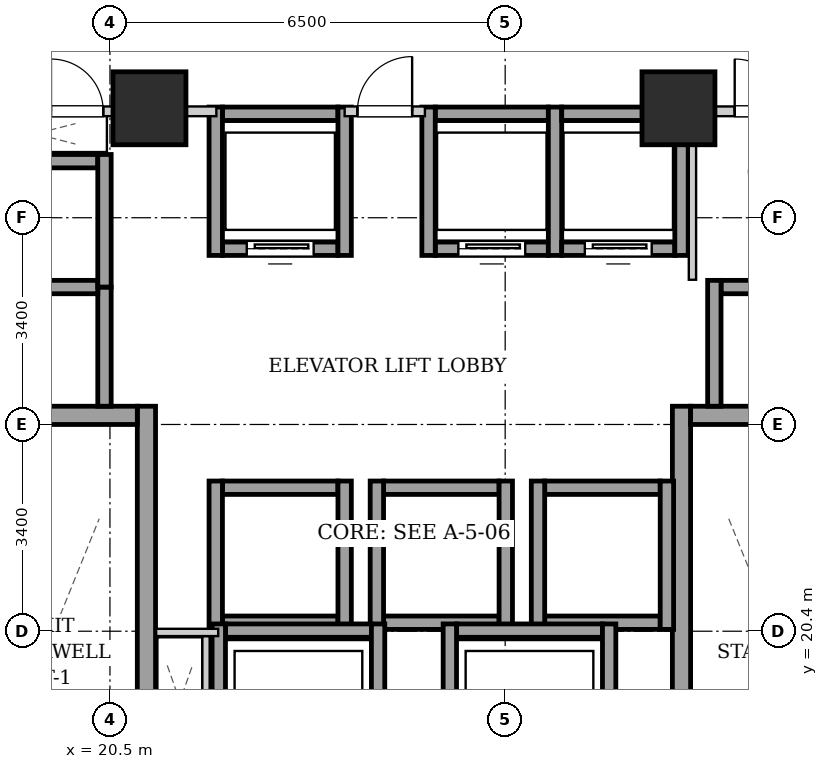
"""IFC4 building model, lengths in metres.
Left out: names, types, materials, properties, quantities, classifications, styles, units other than length and angle.
Written with IfcOpenShell. Run it as: python <this file> out.ifc"""

import sys

from ifc_helpers import new_model, si_unit, direction, frame, frame_2d, origin, origin_2d, place, context, subcontext, project, spatial, rectangle, extrude, element, fill, save


model = new_model("IFC4")
c1 = context("Model", 3, precision=1e-05, world=origin(), true_north=direction((0.0, 1.0)))
c2 = subcontext(c1, "Body", "Model", "MODEL_VIEW")
j1 = project(units=[si_unit("LENGTHUNIT", "METRE"), si_unit("PLANEANGLEUNIT", "RADIAN")], contexts=[c1])
p1 = place(None, origin())
s1 = spatial("IfcSite", under=j1, at=p1, CompositionType="ELEMENT")
p2 = place(p1, origin())
s2 = spatial("IfcBuilding", under=s1, at=p2, CompositionType="ELEMENT")
p3 = place(p2, frame((0.0, 0.0, 32.2)))
s3 = spatial("IfcBuildingStorey", under=s2, at=p3, CompositionType="ELEMENT", Elevation=32.2)
for number, where, z_axis, x_axis in (
    (1, (21.15, 29.0, 0.0), (0.0, 0.0, 1.0), (1.0, 0.0, 0.0)),
    (2, (29.85, 29.0, 0.0), (0.0, 0.0, 1.0), (1.0, 0.0, 0.0)),
):
    element("IfcColumn", number, at=place(p3, frame(where, z_axis=z_axis, x_axis=x_axis)), inside=s3, PredefinedType="COLUMN", context=c2, shape_type="SweptSolid", body=[
        extrude(rectangle(XDim=1.2, YDim=1.2, at=origin_2d()), origin(), (0.0, 0.0, 1.0), 3.2),
    ])
p4 = place(p3, frame((21.1, 15.1, 0.0), z_axis=(0.0, 0.0, 1.0), x_axis=(0.0, 1.0, 0.0)))
e3 = element("IfcWall", 3, at=p4, inside=s3, PredefinedType="SHEAR", context=c2, shape_type="SweptSolid", body=[
    extrude(rectangle(XDim=9.0, YDim=0.3, at=frame_2d((4.5, 0.0))), origin(), (0.0, 0.0, 1.0), 2.94),
])
p5 = place(p3, frame((18.1, 23.95, 0.0), z_axis=(0.0, 0.0, 1.0), x_axis=(1.0, 0.0, 0.0)))
e4 = element("IfcWall", 4, at=p5, inside=s3, PredefinedType="SHEAR", context=c2, shape_type="SweptSolid", body=[
    extrude(rectangle(XDim=2.85, YDim=0.3, at=frame_2d((1.425, 0.0))), origin(), (0.0, 0.0, 1.0), 2.94),
])
p6 = place(p3, frame((29.9, 15.1, 0.0), z_axis=(0.0, 0.0, 1.0), x_axis=(0.0, 1.0, 0.0)))
e5 = element("IfcWall", 5, at=p6, inside=s3, PredefinedType="SHEAR", context=c2, shape_type="SweptSolid", body=[
    extrude(rectangle(XDim=9.0, YDim=0.3, at=frame_2d((4.5, 0.0))), origin(), (0.0, 0.0, 1.0), 2.94),
])
p7 = place(p3, frame((30.05, 23.95, 0.0), z_axis=(0.0, 0.0, 1.0), x_axis=(1.0, 0.0, 0.0)))
e6 = element("IfcWall", 6, at=p7, inside=s3, PredefinedType="SHEAR", context=c2, shape_type="SweptSolid", body=[
    extrude(rectangle(XDim=2.85, YDim=0.3, at=frame_2d((1.425, 0.0))), origin(), (0.0, 0.0, 1.0), 2.94),
])
p8 = place(p3, frame((22.35, 26.69, 0.0), z_axis=(0.0, 0.0, 1.0), x_axis=(1.0, 0.0, 0.0)))
e7 = element("IfcWall", 7, at=p8, inside=s3, PredefinedType="SHEAR", context=c2, shape_type="SweptSolid", body=[
    extrude(rectangle(XDim=1.9, YDim=0.22, at=frame_2d((0.95, 0.0))), origin(), (0.0, 0.0, 1.0), 2.94),
])
p9 = place(p8, frame((0.4, 0.0, 0.0)))
e8 = element("IfcOpeningElement", 8, at=p9, cuts=e7, PredefinedType="OPENING", context=c2, shape_type="SweptSolid", body=[
    extrude(rectangle(XDim=1.1, YDim=2.15, at=frame_2d((0.55, 1.075))), frame((0.0, 0.12, 0.0), z_axis=(0.0, -1.0, 0.0), x_axis=(1.0, 0.0, 0.0)), (0.0, 0.0, 1.0), 0.24),
])
p10 = place(p3, frame((22.35, 28.91, 0.0), z_axis=(0.0, 0.0, 1.0), x_axis=(1.0, 0.0, 0.0)))
e9 = element("IfcWall", 9, at=p10, inside=s3, PredefinedType="SHEAR", context=c2, shape_type="SweptSolid", body=[
    extrude(rectangle(XDim=1.9, YDim=0.22, at=frame_2d((0.95, 0.0))), origin(), (0.0, 0.0, 1.0), 2.94),
])
for number, where, z_axis, x_axis in (
    (10, (22.24, 26.58, 0.0), (0.0, 0.0, 1.0), (0.0, 1.0, 0.0)),
    (11, (24.36, 26.58, 0.0), (0.0, 0.0, 1.0), (0.0, 1.0, 0.0)),
):
    element("IfcWall", number, at=place(p3, frame(where, z_axis=z_axis, x_axis=x_axis)), inside=s3, PredefinedType="SHEAR", context=c2, shape_type="SweptSolid", body=[
        extrude(rectangle(XDim=2.44, YDim=0.22, at=frame_2d((1.22, 0.0))), origin(), (0.0, 0.0, 1.0), 2.94),
    ])
p11 = place(p3, frame((25.85, 26.69, 0.0), z_axis=(0.0, 0.0, 1.0), x_axis=(1.0, 0.0, 0.0)))
e12 = element("IfcWall", 12, at=p11, inside=s3, PredefinedType="SHEAR", context=c2, shape_type="SweptSolid", body=[
    extrude(rectangle(XDim=1.86, YDim=0.22, at=frame_2d((0.93, 0.0))), origin(), (0.0, 0.0, 1.0), 2.94),
])
p12 = place(p11, frame((0.38, 0.0, 0.0)))
e13 = element("IfcOpeningElement", 13, at=p12, cuts=e12, PredefinedType="OPENING", context=c2, shape_type="SweptSolid", body=[
    extrude(rectangle(XDim=1.1, YDim=2.15, at=frame_2d((0.55, 1.075))), frame((0.0, 0.12, 0.0), z_axis=(0.0, -1.0, 0.0), x_axis=(1.0, 0.0, 0.0)), (0.0, 0.0, 1.0), 0.24),
])
p13 = place(p3, frame((25.85, 28.91, 0.0), z_axis=(0.0, 0.0, 1.0), x_axis=(1.0, 0.0, 0.0)))
e14 = element("IfcWall", 14, at=p13, inside=s3, PredefinedType="SHEAR", context=c2, shape_type="SweptSolid", body=[
    extrude(rectangle(XDim=1.86, YDim=0.22, at=frame_2d((0.93, 0.0))), origin(), (0.0, 0.0, 1.0), 2.94),
])
for number, where, z_axis, x_axis in (
    (15, (25.74, 26.58, 0.0), (0.0, 0.0, 1.0), (0.0, 1.0, 0.0)),
    (16, (27.82, 26.58, 0.0), (0.0, 0.0, 1.0), (0.0, 1.0, 0.0)),
):
    element("IfcWall", number, at=place(p3, frame(where, z_axis=z_axis, x_axis=x_axis)), inside=s3, PredefinedType="SHEAR", context=c2, shape_type="SweptSolid", body=[
        extrude(rectangle(XDim=2.44, YDim=0.22, at=frame_2d((1.22, 0.0))), origin(), (0.0, 0.0, 1.0), 2.94),
    ])
p14 = place(p3, frame((27.93, 26.69, 0.0), z_axis=(0.0, 0.0, 1.0), x_axis=(1.0, 0.0, 0.0)))
e17 = element("IfcWall", 17, at=p14, inside=s3, PredefinedType="SHEAR", context=c2, shape_type="SweptSolid", body=[
    extrude(rectangle(XDim=1.86, YDim=0.22, at=frame_2d((0.93, 0.0))), origin(), (0.0, 0.0, 1.0), 2.94),
])
p15 = place(p14, frame((0.38, 0.0, 0.0)))
e18 = element("IfcOpeningElement", 18, at=p15, cuts=e17, PredefinedType="OPENING", context=c2, shape_type="SweptSolid", body=[
    extrude(rectangle(XDim=1.1, YDim=2.15, at=frame_2d((0.55, 1.075))), frame((0.0, 0.12, 0.0), z_axis=(0.0, -1.0, 0.0), x_axis=(1.0, 0.0, 0.0)), (0.0, 0.0, 1.0), 0.24),
])
p16 = place(p3, frame((27.93, 28.91, 0.0), z_axis=(0.0, 0.0, 1.0), x_axis=(1.0, 0.0, 0.0)))
e19 = element("IfcWall", 19, at=p16, inside=s3, PredefinedType="SHEAR", context=c2, shape_type="SweptSolid", body=[
    extrude(rectangle(XDim=1.86, YDim=0.22, at=frame_2d((0.93, 0.0))), origin(), (0.0, 0.0, 1.0), 2.94),
])
p17 = place(p3, frame((29.9, 26.58, 0.0), z_axis=(0.0, 0.0, 1.0), x_axis=(0.0, 1.0, 0.0)))
e20 = element("IfcWall", 20, at=p17, inside=s3, PredefinedType="SHEAR", context=c2, shape_type="SweptSolid", body=[
    extrude(rectangle(XDim=2.44, YDim=0.22, at=frame_2d((1.22, 0.0))), origin(), (0.0, 0.0, 1.0), 2.94),
])
for number, where, z_axis, x_axis in (
    (21, (22.35, 20.54, 0.0), (0.0, 0.0, 1.0), (1.0, 0.0, 0.0)),
    (22, (22.35, 22.76, 0.0), (0.0, 0.0, 1.0), (1.0, 0.0, 0.0)),
):
    element("IfcWall", number, at=place(p3, frame(where, z_axis=z_axis, x_axis=x_axis)), inside=s3, PredefinedType="SHEAR", context=c2, shape_type="SweptSolid", body=[
        extrude(rectangle(XDim=1.9, YDim=0.22, at=frame_2d((0.95, 0.0))), origin(), (0.0, 0.0, 1.0), 2.94),
    ])
for number, where, z_axis, x_axis in (
    (23, (22.24, 20.43, 0.0), (0.0, 0.0, 1.0), (0.0, 1.0, 0.0)),
    (24, (24.36, 20.43, 0.0), (0.0, 0.0, 1.0), (0.0, 1.0, 0.0)),
):
    element("IfcWall", number, at=place(p3, frame(where, z_axis=z_axis, x_axis=x_axis)), inside=s3, PredefinedType="SHEAR", context=c2, shape_type="SweptSolid", body=[
        extrude(rectangle(XDim=2.44, YDim=0.22, at=frame_2d((1.22, 0.0))), origin(), (0.0, 0.0, 1.0), 2.94),
    ])
for number, where, z_axis, x_axis in (
    (25, (25.0, 20.54, 0.0), (0.0, 0.0, 1.0), (1.0, 0.0, 0.0)),
    (26, (25.0, 22.76, 0.0), (0.0, 0.0, 1.0), (1.0, 0.0, 0.0)),
):
    element("IfcWall", number, at=place(p3, frame(where, z_axis=z_axis, x_axis=x_axis)), inside=s3, PredefinedType="SHEAR", context=c2, shape_type="SweptSolid", body=[
        extrude(rectangle(XDim=1.9, YDim=0.22, at=frame_2d((0.95, 0.0))), origin(), (0.0, 0.0, 1.0), 2.94),
    ])
for number, where, z_axis, x_axis in (
    (27, (24.89, 20.43, 0.0), (0.0, 0.0, 1.0), (0.0, 1.0, 0.0)),
    (28, (27.01, 20.43, 0.0), (0.0, 0.0, 1.0), (0.0, 1.0, 0.0)),
):
    element("IfcWall", number, at=place(p3, frame(where, z_axis=z_axis, x_axis=x_axis)), inside=s3, PredefinedType="SHEAR", context=c2, shape_type="SweptSolid", body=[
        extrude(rectangle(XDim=2.44, YDim=0.22, at=frame_2d((1.22, 0.0))), origin(), (0.0, 0.0, 1.0), 2.94),
    ])
for number, where, z_axis, x_axis in (
    (29, (27.65, 20.54, 0.0), (0.0, 0.0, 1.0), (1.0, 0.0, 0.0)),
    (30, (27.65, 22.76, 0.0), (0.0, 0.0, 1.0), (1.0, 0.0, 0.0)),
):
    element("IfcWall", number, at=place(p3, frame(where, z_axis=z_axis, x_axis=x_axis)), inside=s3, PredefinedType="SHEAR", context=c2, shape_type="SweptSolid", body=[
        extrude(rectangle(XDim=1.9, YDim=0.22, at=frame_2d((0.95, 0.0))), origin(), (0.0, 0.0, 1.0), 2.94),
    ])
for number, where, z_axis, x_axis in (
    (31, (27.54, 20.43, 0.0), (0.0, 0.0, 1.0), (0.0, 1.0, 0.0)),
    (32, (29.66, 20.43, 0.0), (0.0, 0.0, 1.0), (0.0, 1.0, 0.0)),
):
    element("IfcWall", number, at=place(p3, frame(where, z_axis=z_axis, x_axis=x_axis)), inside=s3, PredefinedType="SHEAR", context=c2, shape_type="SweptSolid", body=[
        extrude(rectangle(XDim=2.44, YDim=0.22, at=frame_2d((1.22, 0.0))), origin(), (0.0, 0.0, 1.0), 2.94),
    ])
p18 = place(p3, frame((20.41, 24.1, 0.0), z_axis=(0.0, 0.0, 1.0), x_axis=(0.0, 1.0, 0.0)))
e33 = element("IfcWall", 33, at=p18, inside=s3, PredefinedType="SHEAR", context=c2, shape_type="SweptSolid", body=[
    extrude(rectangle(XDim=1.96, YDim=0.22, at=frame_2d((0.98, 0.0))), origin(), (0.0, 0.0, 1.0), 2.94),
])
for number, where, z_axis, x_axis in (
    (34, (18.4, 26.06, 0.0), (0.0, 0.0, 1.0), (1.0, 0.0, 0.0)),
    (35, (18.4, 28.13, 0.0), (0.0, 0.0, 1.0), (1.0, 0.0, 0.0)),
):
    element("IfcWall", number, at=place(p3, frame(where, z_axis=z_axis, x_axis=x_axis)), inside=s3, PredefinedType="SHEAR", context=c2, shape_type="SweptSolid", body=[
        extrude(rectangle(XDim=1.9, YDim=0.22, at=frame_2d((0.95, 0.0))), origin(), (0.0, 0.0, 1.0), 2.94),
    ])
p19 = place(p3, frame((20.41, 26.06, 0.0), z_axis=(0.0, 0.0, 1.0), x_axis=(0.0, 1.0, 0.0)))
e36 = element("IfcWall", 36, at=p19, inside=s3, PredefinedType="SHEAR", context=c2, shape_type="SweptSolid", body=[
    extrude(rectangle(XDim=2.18, YDim=0.22, at=frame_2d((1.09, 0.0))), origin(), (0.0, 0.0, 1.0), 2.94),
])
p20 = place(p3, frame((30.55, 26.06, 0.0), z_axis=(0.0, 0.0, 1.0), x_axis=(1.0, 0.0, 0.0)))
e37 = element("IfcWall", 37, at=p20, inside=s3, PredefinedType="SHEAR", context=c2, shape_type="SweptSolid", body=[
    extrude(rectangle(XDim=1.9, YDim=0.22, at=frame_2d((0.95, 0.0))), origin(), (0.0, 0.0, 1.0), 2.94),
])
p21 = place(p3, frame((30.44, 24.1, 0.0), z_axis=(0.0, 0.0, 1.0), x_axis=(0.0, 1.0, 0.0)))
e38 = element("IfcWall", 38, at=p21, inside=s3, PredefinedType="SHEAR", context=c2, shape_type="SweptSolid", body=[
    extrude(rectangle(XDim=2.07, YDim=0.22, at=frame_2d((1.035, 0.0))), origin(), (0.0, 0.0, 1.0), 2.94),
])
p22 = place(p3, frame((22.4, 20.41, 0.0), z_axis=(0.0, 0.0, 1.0), x_axis=(1.0, 0.0, 0.0)))
e39 = element("IfcWall", 39, at=p22, inside=s3, PredefinedType="SHEAR", context=c2, shape_type="SweptSolid", body=[
    extrude(rectangle(XDim=2.4, YDim=0.22, at=frame_2d((1.2, 0.0))), origin(), (0.0, 0.0, 1.0), 2.94),
])
for number, where, z_axis, x_axis in (
    (40, (22.29, 17.98, 0.0), (0.0, 0.0, 1.0), (0.0, 1.0, 0.0)),
    (41, (24.91, 17.98, 0.0), (0.0, 0.0, 1.0), (0.0, 1.0, 0.0)),
):
    element("IfcWall", number, at=place(p3, frame(where, z_axis=z_axis, x_axis=x_axis)), inside=s3, PredefinedType="SHEAR", context=c2, shape_type="SweptSolid", body=[
        extrude(rectangle(XDim=2.54, YDim=0.22, at=frame_2d((1.27, 0.0))), origin(), (0.0, 0.0, 1.0), 2.94),
    ])
p23 = place(p3, frame((26.2, 20.41, 0.0), z_axis=(0.0, 0.0, 1.0), x_axis=(1.0, 0.0, 0.0)))
e42 = element("IfcWall", 42, at=p23, inside=s3, PredefinedType="SHEAR", context=c2, shape_type="SweptSolid", body=[
    extrude(rectangle(XDim=2.4, YDim=0.22, at=frame_2d((1.2, 0.0))), origin(), (0.0, 0.0, 1.0), 2.94),
])
for number, where, z_axis, x_axis in (
    (43, (26.09, 17.98, 0.0), (0.0, 0.0, 1.0), (0.0, 1.0, 0.0)),
    (44, (28.71, 17.98, 0.0), (0.0, 0.0, 1.0), (0.0, 1.0, 0.0)),
):
    element("IfcWall", number, at=place(p3, frame(where, z_axis=z_axis, x_axis=x_axis)), inside=s3, PredefinedType="SHEAR", context=c2, shape_type="SweptSolid", body=[
        extrude(rectangle(XDim=2.54, YDim=0.22, at=frame_2d((1.27, 0.0))), origin(), (0.0, 0.0, 1.0), 2.94),
    ])
p24 = place(p3, frame((24.36, 28.95, 0.0), z_axis=(0.0, 0.0, 1.0), x_axis=(1.0, 0.0, 0.0)))
e45 = element("IfcWall", 45, at=p24, inside=s3, PredefinedType="PARTITIONING", context=c2, shape_type="SweptSolid", body=[
    extrude(rectangle(XDim=1.32, YDim=0.16, at=frame_2d((0.66, 0.0))), origin(), (0.0, 0.0, 1.0), 2.155),
])
p25 = place(p24, frame((0.21, 0.0, 0.0)))
e46 = element("IfcOpeningElement", 46, at=p25, cuts=e45, PredefinedType="OPENING", context=c2, shape_type="SweptSolid", body=[
    extrude(rectangle(XDim=0.9, YDim=2.05, at=frame_2d((0.45, 1.025))), frame((0.0, 0.09, 0.0), z_axis=(0.0, -1.0, 0.0), x_axis=(1.0, 0.0, 0.0)), (0.0, 0.0, 1.0), 0.18),
])
p26 = place(p3, frame((17.96, 28.95, 0.0), z_axis=(0.0, 0.0, 1.0), x_axis=(1.0, 0.0, 0.0)))
e47 = element("IfcWall", 47, at=p26, inside=s3, PredefinedType="PARTITIONING", context=c2, shape_type="SweptSolid", body=[
    extrude(rectangle(XDim=4.29, YDim=0.16, at=frame_2d((2.145, 0.0))), origin(), (0.0, 0.0, 1.0), 2.155),
])
p27 = place(p26, frame((1.57, 0.0, 0.0)))
e48 = element("IfcOpeningElement", 48, at=p27, cuts=e47, PredefinedType="OPENING", context=c2, shape_type="SweptSolid", body=[
    extrude(rectangle(XDim=0.86, YDim=2.05, at=frame_2d((0.43, 1.025))), frame((0.0, 0.09, 0.0), z_axis=(0.0, -1.0, 0.0), x_axis=(1.0, 0.0, 0.0)), (0.0, 0.0, 1.0), 0.18),
])
p28 = place(p3, frame((22.08, 18.2, 0.0), z_axis=(0.0, 0.0, 1.0), x_axis=(0.0, 1.0, 0.0)))
e49 = element("IfcWall", 49, at=p28, inside=s3, PredefinedType="PARTITIONING", context=c2, shape_type="SweptSolid", body=[
    extrude(rectangle(XDim=2.12, YDim=0.12, at=frame_2d((1.06, 0.0))), origin(), (0.0, 0.0, 1.0), 2.94),
])
p29 = place(p3, frame((22.28, 20.38, 0.0), z_axis=(0.0, 0.0, 1.0), x_axis=(-1.0, 0.0, 0.0)))
e50 = element("IfcWall", 50, at=p29, inside=s3, PredefinedType="PARTITIONING", context=c2, shape_type="SweptSolid", body=[
    extrude(rectangle(XDim=1.02, YDim=0.12, at=frame_2d((0.51, 0.0))), origin(), (0.0, 0.0, 1.0), 2.94),
])
p30 = place(p3, frame((30.08, 26.18, 0.0), z_axis=(0.0, 0.0, 1.0), x_axis=(0.0, 1.0, 0.0)))
e51 = element("IfcWall", 51, at=p30, inside=s3, PredefinedType="PARTITIONING", context=c2, shape_type="SweptSolid", body=[
    extrude(rectangle(XDim=2.68, YDim=0.12, at=frame_2d((1.34, 0.0))), origin(), (0.0, 0.0, 1.0), 2.94),
])
p31 = place(p3, frame((30.08, 28.95, 0.0), z_axis=(0.0, 0.0, 1.0), x_axis=(1.0, 0.0, 0.0)))
e52 = element("IfcWall", 52, at=p31, inside=s3, PredefinedType="PARTITIONING", context=c2, shape_type="SweptSolid", body=[
    extrude(rectangle(XDim=2.96, YDim=0.16, at=frame_2d((1.48, 0.0))), origin(), (0.0, 0.0, 1.0), 2.94),
])
p32 = place(p31, frame((0.695, 0.0, 0.0)))
e53 = element("IfcOpeningElement", 53, at=p32, cuts=e52, PredefinedType="OPENING", context=c2, shape_type="SweptSolid", body=[
    extrude(rectangle(XDim=0.86, YDim=2.05, at=frame_2d((0.43, 1.025))), frame((0.0, 0.09, 0.0), z_axis=(0.0, -1.0, 0.0), x_axis=(1.0, 0.0, 0.0)), (0.0, 0.0, 1.0), 0.18),
])
p33 = place(p9, origin())
e54 = element("IfcDoor", 54, at=p33, inside=s3, OperationType="SLIDING_TO_LEFT", PredefinedType="DOOR", context=c2, shape_type="SweptSolid", body=[
    extrude(rectangle(XDim=1.1, YDim=2.15, at=frame_2d((0.55, 1.075))), frame((0.0, 0.025, 0.0), z_axis=(0.0, -1.0, 0.0), x_axis=(1.0, 0.0, 0.0)), (0.0, 0.0, 1.0), 0.05),
])
fill(e8, e54)
p34 = place(p12, origin())
e55 = element("IfcDoor", 55, at=p34, inside=s3, OperationType="SLIDING_TO_LEFT", PredefinedType="DOOR", context=c2, shape_type="SweptSolid", body=[
    extrude(rectangle(XDim=1.1, YDim=2.15, at=frame_2d((0.55, 1.075))), frame((0.0, 0.025, 0.0), z_axis=(0.0, -1.0, 0.0), x_axis=(1.0, 0.0, 0.0)), (0.0, 0.0, 1.0), 0.05),
])
fill(e13, e55)
p35 = place(p15, origin())
e56 = element("IfcDoor", 56, at=p35, inside=s3, OperationType="SLIDING_TO_LEFT", PredefinedType="DOOR", context=c2, shape_type="SweptSolid", body=[
    extrude(rectangle(XDim=1.1, YDim=2.15, at=frame_2d((0.55, 1.075))), frame((0.0, 0.025, 0.0), z_axis=(0.0, -1.0, 0.0), x_axis=(1.0, 0.0, 0.0)), (0.0, 0.0, 1.0), 0.05),
])
fill(e18, e56)
p36 = place(p25, origin())
e57 = element("IfcDoor", 57, at=p36, inside=s3, OperationType="SINGLE_SWING_RIGHT", PredefinedType="DOOR", context=c2, shape_type="SweptSolid", body=[
    extrude(rectangle(XDim=0.9, YDim=2.05, at=frame_2d((0.45, 1.025))), frame((0.0, 0.025, 0.0), z_axis=(0.0, -1.0, 0.0), x_axis=(1.0, 0.0, 0.0)), (0.0, 0.0, 1.0), 0.05),
])
fill(e46, e57)
p37 = place(p27, origin())
e58 = element("IfcDoor", 58, at=p37, inside=s3, OperationType="SINGLE_SWING_LEFT", PredefinedType="DOOR", context=c2, shape_type="SweptSolid", body=[
    extrude(rectangle(XDim=0.86, YDim=2.05, at=frame_2d((0.43, 1.025))), frame((0.0, 0.025, 0.0), z_axis=(0.0, -1.0, 0.0), x_axis=(1.0, 0.0, 0.0)), (0.0, 0.0, 1.0), 0.05),
])
fill(e48, e58)
p38 = place(p32, origin())
e59 = element("IfcDoor", 59, at=p38, inside=s3, OperationType="SINGLE_SWING_LEFT", PredefinedType="DOOR", context=c2, shape_type="SweptSolid", body=[
    extrude(rectangle(XDim=0.86, YDim=2.05, at=frame_2d((0.43, 1.025))), frame((0.0, 0.025, 0.0), z_axis=(0.0, -1.0, 0.0), x_axis=(1.0, 0.0, 0.0)), (0.0, 0.0, 1.0), 0.05),
])
fill(e53, e59)
save(model, sys.argv[1])
